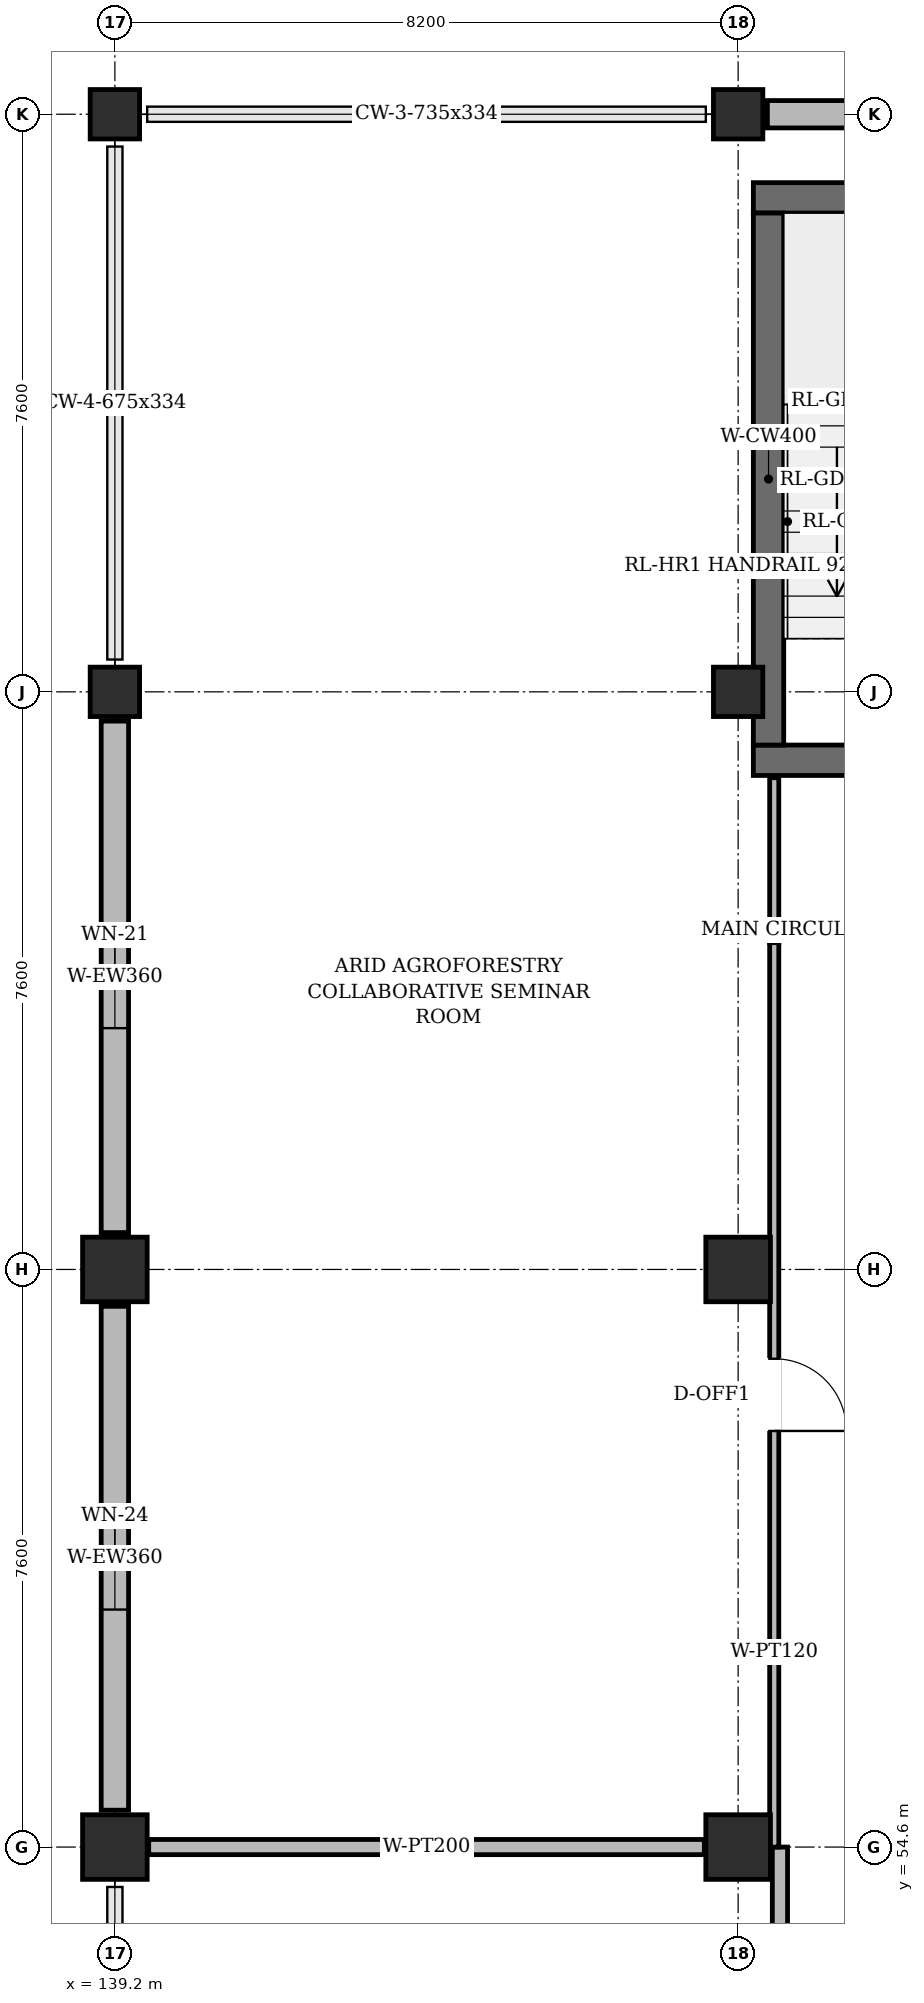
"""IFC4 building model, lengths in metres.
Left out: names, types, materials, properties, quantities, classifications, styles, units other than length and angle.
Written with IfcOpenShell. Run it as: python <this file> out.ifc"""

import sys

from ifc_helpers import new_model, si_unit, direction, frame, frame_2d, origin, origin_2d, place, context, subcontext, project, spatial, rectangle, extrude, element, fill, save


model = new_model("IFC4")
c1 = context("Model", 3, precision=1e-05, world=origin(), true_north=direction((0.0, 1.0)))
c2 = subcontext(c1, "Body", "Model", "MODEL_VIEW")
j1 = project(units=[si_unit("LENGTHUNIT", "METRE"), si_unit("PLANEANGLEUNIT", "RADIAN")], contexts=[c1])
p1 = place(None, origin())
s1 = spatial("IfcSite", under=j1, at=p1, CompositionType="ELEMENT")
p2 = place(p1, origin())
s2 = spatial("IfcBuilding", under=s1, at=p2, CompositionType="ELEMENT")
p3 = place(p2, frame((0.0, 0.0, 28.2)))
s3 = spatial("IfcBuildingStorey", under=s2, at=p3, CompositionType="ELEMENT", Elevation=28.2)
for number, where, z_axis, x_axis in (
    (1, (139.2, 54.6, 0.0), (0.0, 0.0, 1.0), (1.0, 0.0, 0.0)),
    (2, (139.2, 62.2, 0.0), (0.0, 0.0, 1.0), (1.0, 0.0, 0.0)),
):
    element("IfcColumn", number, at=place(p3, frame(where, z_axis=z_axis, x_axis=x_axis)), inside=s3, PredefinedType="COLUMN", context=c2, shape_type="SweptSolid", body=[
        extrude(rectangle(XDim=0.85, YDim=0.85, at=origin_2d()), origin(), (0.0, 0.0, 1.0), 3.94),
    ])
for number, where, z_axis, x_axis in (
    (3, (139.2, 69.8, 0.0), (0.0, 0.0, 1.0), (1.0, 0.0, 0.0)),
    (4, (139.2, 77.4, 0.0), (0.0, 0.0, 1.0), (1.0, 0.0, 0.0)),
):
    element("IfcColumn", number, at=place(p3, frame(where, z_axis=z_axis, x_axis=x_axis)), inside=s3, PredefinedType="COLUMN", context=c2, shape_type="SweptSolid", body=[
        extrude(rectangle(XDim=0.65, YDim=0.65, at=origin_2d()), origin(), (0.0, 0.0, 1.0), 3.94),
    ])
for number, where, z_axis, x_axis in (
    (5, (147.4, 54.6, 0.0), (0.0, 0.0, 1.0), (1.0, 0.0, 0.0)),
    (6, (147.4, 62.2, 0.0), (0.0, 0.0, 1.0), (1.0, 0.0, 0.0)),
):
    element("IfcColumn", number, at=place(p3, frame(where, z_axis=z_axis, x_axis=x_axis)), inside=s3, PredefinedType="COLUMN", context=c2, shape_type="SweptSolid", body=[
        extrude(rectangle(XDim=0.85, YDim=0.85, at=origin_2d()), origin(), (0.0, 0.0, 1.0), 3.94),
    ])
for number, where, z_axis, x_axis in (
    (7, (147.4, 69.8, 0.0), (0.0, 0.0, 1.0), (1.0, 0.0, 0.0)),
    (8, (147.4, 77.4, 0.0), (0.0, 0.0, 1.0), (1.0, 0.0, 0.0)),
):
    element("IfcColumn", number, at=place(p3, frame(where, z_axis=z_axis, x_axis=x_axis)), inside=s3, PredefinedType="COLUMN", context=c2, shape_type="SweptSolid", body=[
        extrude(rectangle(XDim=0.65, YDim=0.65, at=origin_2d()), origin(), (0.0, 0.0, 1.0), 3.94),
    ])
p4 = place(p3, frame((155.215, 77.4, 0.0), z_axis=(0.0, 0.0, 1.0), x_axis=(-1.0, 0.0, 0.0)))
e9 = element("IfcWall", 9, at=p4, inside=s3, PredefinedType="SOLIDWALL", context=c2, shape_type="SweptSolid", body=[
    extrude(rectangle(XDim=7.43, YDim=0.36, at=frame_2d((3.715, 0.0))), origin(), (0.0, 0.0, 1.0), 3.325),
])
p5 = place(p4, frame((2.69, 0.0, 0.95)))
e10 = element("IfcOpeningElement", 10, at=p5, cuts=e9, PredefinedType="OPENING", context=c2, shape_type="SweptSolid", body=[
    extrude(rectangle(XDim=2.05, YDim=2.05, at=frame_2d((1.025, 1.025))), frame((0.0, 0.192, 0.0), z_axis=(0.0, -1.0, 0.0), x_axis=(1.0, 0.0, 0.0)), (0.0, 0.0, 1.0), 0.384),
])
p6 = place(p3, frame((139.2, 69.415, 0.0), z_axis=(0.0, 0.0, 1.0), x_axis=(0.0, -1.0, 0.0)))
e11 = element("IfcWall", 11, at=p6, inside=s3, PredefinedType="SOLIDWALL", context=c2, shape_type="SweptSolid", body=[
    extrude(rectangle(XDim=6.73, YDim=0.36, at=frame_2d((3.365, 0.0))), origin(), (0.0, 0.0, 1.0), 3.325),
])
p7 = place(p6, frame((2.69, 0.0, 0.95)))
e12 = element("IfcOpeningElement", 12, at=p7, cuts=e11, PredefinedType="OPENING", context=c2, shape_type="SweptSolid", body=[
    extrude(rectangle(XDim=1.35, YDim=1.25, at=frame_2d((0.675, 0.625))), frame((0.0, 0.192, 0.0), z_axis=(0.0, -1.0, 0.0), x_axis=(1.0, 0.0, 0.0)), (0.0, 0.0, 1.0), 0.384),
])
p8 = place(p3, frame((139.2, 61.715, 0.0), z_axis=(0.0, 0.0, 1.0), x_axis=(0.0, -1.0, 0.0)))
e13 = element("IfcWall", 13, at=p8, inside=s3, PredefinedType="SOLIDWALL", context=c2, shape_type="SweptSolid", body=[
    extrude(rectangle(XDim=6.63, YDim=0.36, at=frame_2d((3.315, 0.0))), origin(), (0.0, 0.0, 1.0), 3.325),
])
p9 = place(p8, frame((2.64, 0.0, 0.95)))
e14 = element("IfcOpeningElement", 14, at=p9, cuts=e13, PredefinedType="OPENING", context=c2, shape_type="SweptSolid", body=[
    extrude(rectangle(XDim=1.35, YDim=2.05, at=frame_2d((0.675, 1.025))), frame((0.0, 0.192, 0.0), z_axis=(0.0, -1.0, 0.0), x_axis=(1.0, 0.0, 0.0)), (0.0, 0.0, 1.0), 0.384),
])
p10 = place(p3, frame((147.6, 68.9, 0.0), z_axis=(0.0, 0.0, 1.0), x_axis=(1.0, 0.0, 0.0)))
e15 = element("IfcWall", 15, at=p10, inside=s3, PredefinedType="SHEAR", context=c2, shape_type="SweptSolid", body=[
    extrude(rectangle(XDim=3.8, YDim=0.4, at=frame_2d((1.9, 0.0))), origin(), (0.0, 0.0, 1.0), 3.94),
])
p11 = place(p10, frame((1.3, 0.0, 0.0)))
e16 = element("IfcOpeningElement", 16, at=p11, cuts=e15, PredefinedType="OPENING", context=c2, shape_type="SweptSolid", body=[
    extrude(rectangle(XDim=1.2, YDim=2.2, at=frame_2d((0.6, 1.1))), frame((0.0, 0.212, 0.0), z_axis=(0.0, -1.0, 0.0), x_axis=(1.0, 0.0, 0.0)), (0.0, 0.0, 1.0), 0.424),
])
p12 = place(p3, frame((147.6, 76.3, 0.0), z_axis=(0.0, 0.0, 1.0), x_axis=(1.0, 0.0, 0.0)))
e17 = element("IfcWall", 17, at=p12, inside=s3, PredefinedType="SHEAR", context=c2, shape_type="SweptSolid", body=[
    extrude(rectangle(XDim=3.8, YDim=0.4, at=frame_2d((1.9, 0.0))), origin(), (0.0, 0.0, 1.0), 3.94),
])
p13 = place(p3, frame((147.8, 69.1, 0.0), z_axis=(0.0, 0.0, 1.0), x_axis=(0.0, 1.0, 0.0)))
e18 = element("IfcWall", 18, at=p13, inside=s3, PredefinedType="SHEAR", context=c2, shape_type="SweptSolid", body=[
    extrude(rectangle(XDim=7.0, YDim=0.4, at=frame_2d((3.5, 0.0))), origin(), (0.0, 0.0, 1.0), 3.94),
])
p14 = place(p3, frame((147.95, 46.51, 0.0), z_axis=(0.0, 0.0, 1.0), x_axis=(0.0, 1.0, 0.0)))
e19 = element("IfcWall", 19, at=p14, inside=s3, PredefinedType="PARTITIONING", context=c2, shape_type="SweptSolid", body=[
    extrude(rectangle(XDim=8.09, YDim=0.2, at=frame_2d((4.045, 0.0))), origin(), (0.0, 0.0, 1.0), 3.805),
])
p15 = place(p14, frame((3.245, 0.0, 0.0)))
e20 = element("IfcOpeningElement", 20, at=p15, cuts=e19, PredefinedType="OPENING", context=c2, shape_type="SweptSolid", body=[
    extrude(rectangle(XDim=1.6, YDim=2.3, at=frame_2d((0.8, 1.15))), frame((0.0, 0.112, 0.0), z_axis=(0.0, -1.0, 0.0), x_axis=(1.0, 0.0, 0.0)), (0.0, 0.0, 1.0), 0.224),
])
p16 = place(p3, frame((147.875, 54.6, 0.0), z_axis=(0.0, 0.0, 1.0), x_axis=(0.0, 1.0, 0.0)))
e21 = element("IfcWall", 21, at=p16, inside=s3, PredefinedType="PARTITIONING", context=c2, shape_type="SweptSolid", body=[
    extrude(rectangle(XDim=11.9, YDim=0.12, at=frame_2d((5.95, 0.0))), origin(), (0.0, 0.0, 1.0), 3.805),
])
p17 = place(p16, frame((5.475, 0.0, 0.0)))
e22 = element("IfcOpeningElement", 22, at=p17, cuts=e21, PredefinedType="OPENING", context=c2, shape_type="SweptSolid", body=[
    extrude(rectangle(XDim=0.95, YDim=2.2, at=frame_2d((0.475, 1.1))), frame((0.0, 0.072, 0.0), z_axis=(0.0, -1.0, 0.0), x_axis=(1.0, 0.0, 0.0)), (0.0, 0.0, 1.0), 0.144),
])
p18 = place(p3, frame((147.875, 66.5, 0.0), z_axis=(0.0, 0.0, 1.0), x_axis=(0.0, 1.0, 0.0)))
e23 = element("IfcWall", 23, at=p18, inside=s3, PredefinedType="PARTITIONING", context=c2, shape_type="SweptSolid", body=[
    extrude(rectangle(XDim=2.17, YDim=0.12, at=frame_2d((1.085, 0.0))), origin(), (0.0, 0.0, 1.0), 3.805),
])
p19 = place(p3, frame((139.645, 54.6, 0.0), z_axis=(0.0, 0.0, 1.0), x_axis=(1.0, 0.0, 0.0)))
e24 = element("IfcWall", 24, at=p19, inside=s3, PredefinedType="PARTITIONING", context=c2, shape_type="SweptSolid", body=[
    extrude(rectangle(XDim=7.31, YDim=0.2, at=frame_2d((3.655, 0.0))), origin(), (0.0, 0.0, 1.0), 3.275),
])
p20 = place(p7, origin())
e25 = element("IfcWindow", 25, at=p20, inside=s3, PartitioningType="SINGLE_PANEL", PredefinedType="WINDOW", context=c2, shape_type="SweptSolid", body=[
    extrude(rectangle(XDim=1.35, YDim=1.25, at=frame_2d((0.675, 0.625))), frame((0.0, 0.03, 0.0), z_axis=(0.0, -1.0, 0.0), x_axis=(1.0, 0.0, 0.0)), (0.0, 0.0, 1.0), 0.06),
])
fill(e12, e25)
p21 = place(p9, origin())
e26 = element("IfcWindow", 26, at=p21, inside=s3, PartitioningType="SINGLE_PANEL", PredefinedType="WINDOW", context=c2, shape_type="SweptSolid", body=[
    extrude(rectangle(XDim=1.35, YDim=2.05, at=frame_2d((0.675, 1.025))), frame((0.0, 0.03, 0.0), z_axis=(0.0, -1.0, 0.0), x_axis=(1.0, 0.0, 0.0)), (0.0, 0.0, 1.0), 0.06),
])
fill(e14, e26)
p22 = place(p17, frame((0.95, 0.0, 0.0), z_axis=(0.0, 0.0, 1.0), x_axis=(-1.0, 0.0, 0.0)))
e27 = element("IfcDoor", 27, at=p22, inside=s3, OperationType="SINGLE_SWING_RIGHT", PredefinedType="DOOR", context=c2, shape_type="SweptSolid", body=[
    extrude(rectangle(XDim=0.95, YDim=2.2, at=frame_2d((0.475, 1.1))), frame((0.0, 0.025, 0.0), z_axis=(0.0, -1.0, 0.0), x_axis=(1.0, 0.0, 0.0)), (0.0, 0.0, 1.0), 0.05),
])
fill(e22, e27)
save(model, sys.argv[1])
